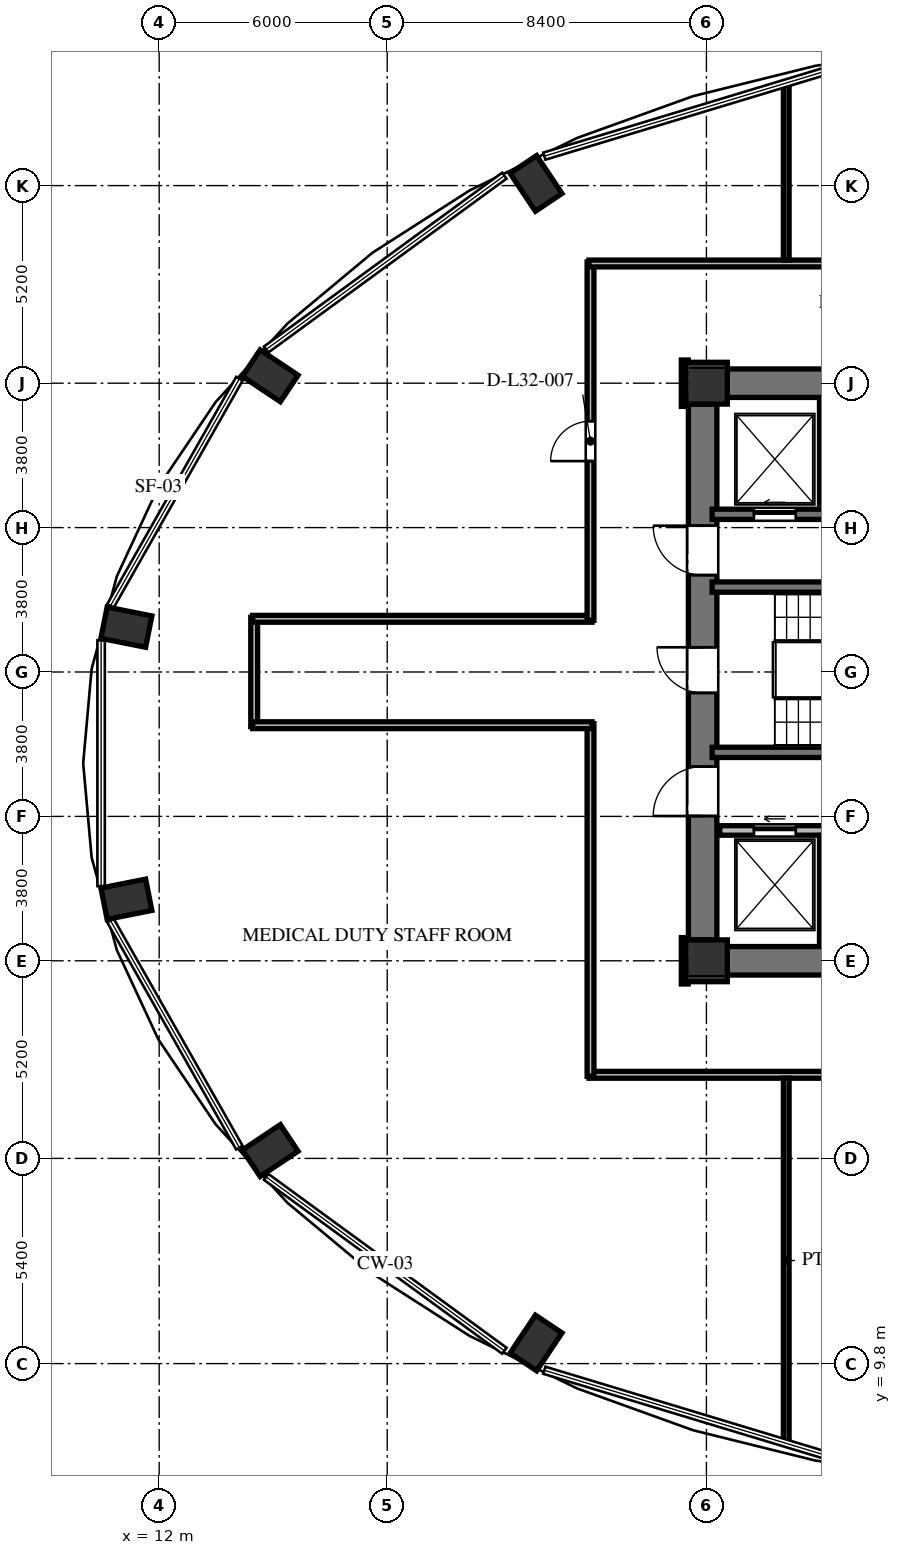
"""IFC4 building model, lengths in metres.
Left out: names, types, materials, properties, quantities, classifications, styles, units other than length and angle.
Written with IfcOpenShell. Run it as: python <this file> out.ifc"""

import sys

from ifc_helpers import new_model, si_unit, direction, frame, frame_2d, origin, origin_2d, place, context, subcontext, project, spatial, rectangle, extrude, element, fill, save


model = new_model("IFC4")
c1 = context("Model", 3, precision=1e-05, world=origin(), true_north=direction((0.0, 1.0)))
c2 = subcontext(c1, "Body", "Model", "MODEL_VIEW")
j1 = project(units=[si_unit("LENGTHUNIT", "METRE"), si_unit("PLANEANGLEUNIT", "RADIAN")], contexts=[c1])
p1 = place(None, origin())
s1 = spatial("IfcSite", under=j1, at=p1, CompositionType="ELEMENT")
p2 = place(p1, origin())
s2 = spatial("IfcBuilding", under=s1, at=p2, CompositionType="ELEMENT")
p3 = place(p2, frame((0.0, 0.0, 125.52)))
s3 = spatial("IfcBuildingStorey", under=s2, at=p3, CompositionType="ELEMENT", Elevation=125.52)
for number, where, z_axis, x_axis in (
    (1, (21.916, 40.857, 0.0), (0.0, 0.0, 1.0), (-0.556, 0.831, 0.0)),
    (2, (14.922, 35.795, 0.0), (0.0, 0.0, 1.0), (-0.831, 0.556, 0.0)),
    (3, (11.137, 29.18, 0.0), (0.0, 0.0, 1.0), (-0.981, 0.195, 0.0)),
    (4, (11.137, 22.02, 0.0), (0.0, 0.0, 1.0), (-0.981, -0.195, 0.0)),
    (5, (14.922, 15.405, 0.0), (0.0, 0.0, 1.0), (-0.831, -0.556, 0.0)),
    (6, (21.916, 10.343, 0.0), (0.0, 0.0, 1.0), (-0.556, -0.831, 0.0)),
):
    element("IfcColumn", number, at=place(p3, frame(where, z_axis=z_axis, x_axis=x_axis)), inside=s3, PredefinedType="COLUMN", context=c2, shape_type="SweptSolid", body=[
        extrude(rectangle(XDim=1.2, YDim=0.84, at=origin_2d()), origin(), (0.0, 0.0, 1.0), 3.648),
    ])
for number, where, z_axis, x_axis in (
    (7, (26.4, 20.4, 0.0), (0.0, 0.0, 1.0), (1.0, 0.0, 0.0)),
    (8, (26.4, 35.6, 0.0), (0.0, 0.0, 1.0), (1.0, 0.0, 0.0)),
):
    element("IfcColumn", number, at=place(p3, frame(where, z_axis=z_axis, x_axis=x_axis)), inside=s3, PredefinedType="COLUMN", context=c2, shape_type="SweptSolid", body=[
        extrude(rectangle(XDim=1.1, YDim=1.1, at=origin_2d()), origin(), (0.0, 0.0, 1.0), 3.648),
    ])
p4 = place(p3, frame((26.3, 20.95, 0.0), z_axis=(0.0, 0.0, 1.0), x_axis=(0.0, 1.0, 0.0)))
e9 = element("IfcWall", 9, at=p4, inside=s3, PredefinedType="SHEAR", context=c2, shape_type="SweptSolid", body=[
    extrude(rectangle(XDim=14.1, YDim=0.75, at=frame_2d((7.05, 0.0))), origin(), (0.0, 0.0, 1.0), 3.648),
])
p5 = place(p4, frame((6.5, 0.0, 0.0)))
e10 = element("IfcOpeningElement", 10, at=p5, cuts=e9, PredefinedType="OPENING", context=c2, shape_type="SweptSolid", body=[
    extrude(rectangle(XDim=1.2, YDim=2.15, at=frame_2d((0.6, 1.075))), frame((0.0, 0.385, 0.0), z_axis=(0.0, -1.0, 0.0), x_axis=(1.0, 0.0, 0.0)), (0.0, 0.0, 1.0), 0.77),
])
p6 = place(p4, frame((9.6, 0.0, 0.0)))
e11 = element("IfcOpeningElement", 11, at=p6, cuts=e9, PredefinedType="OPENING", context=c2, shape_type="SweptSolid", body=[
    extrude(rectangle(XDim=1.3, YDim=2.2, at=frame_2d((0.65, 1.1))), frame((0.0, 0.385, 0.0), z_axis=(0.0, -1.0, 0.0), x_axis=(1.0, 0.0, 0.0)), (0.0, 0.0, 1.0), 0.77),
])
p7 = place(p4, frame((3.26, 0.0, 0.0)))
e12 = element("IfcOpeningElement", 12, at=p7, cuts=e9, PredefinedType="OPENING", context=c2, shape_type="SweptSolid", body=[
    extrude(rectangle(XDim=1.3, YDim=2.2, at=frame_2d((0.65, 1.1))), frame((0.0, 0.385, 0.0), z_axis=(0.0, -1.0, 0.0), x_axis=(1.0, 0.0, 0.0)), (0.0, 0.0, 1.0), 0.77),
])
for number, where, z_axis, x_axis in (
    (13, (26.95, 20.4, 0.0), (0.0, 0.0, 1.0), (1.0, 0.0, 0.0)),
    (14, (26.95, 35.6, 0.0), (0.0, 0.0, 1.0), (1.0, 0.0, 0.0)),
):
    element("IfcWall", number, at=place(p3, frame(where, z_axis=z_axis, x_axis=x_axis)), inside=s3, PredefinedType="SHEAR", context=c2, shape_type="SweptSolid", body=[
        extrude(rectangle(XDim=5.375, YDim=0.75, at=frame_2d((2.688, 0.0))), origin(), (0.0, 0.0, 1.0), 3.648),
    ])
for number, where, z_axis, x_axis in (
    (15, (26.55, 30.235, 0.0), (0.0, 0.0, 1.0), (1.0, 0.0, 0.0)),
    (16, (26.55, 25.885, 0.0), (0.0, 0.0, 1.0), (1.0, 0.0, 0.0)),
):
    element("IfcWall", number, at=place(p3, frame(where, z_axis=z_axis, x_axis=x_axis)), inside=s3, PredefinedType="SHEAR", context=c2, shape_type="SweptSolid", body=[
        extrude(rectangle(XDim=7.985, YDim=0.27, at=frame_2d((3.992, 0.0))), origin(), (0.0, 0.0, 1.0), 3.648),
    ])
p8 = place(p3, frame((26.55, 32.15, 0.0), z_axis=(0.0, 0.0, 1.0), x_axis=(1.0, 0.0, 0.0)))
e17 = element("IfcWall", 17, at=p8, inside=s3, PredefinedType="SHEAR", context=c2, shape_type="SweptSolid", body=[
    extrude(rectangle(XDim=16.4, YDim=0.27, at=frame_2d((8.2, 0.0))), origin(), (0.0, 0.0, 1.0), 3.648),
])
p9 = place(p8, frame((1.1, 0.0, 0.0)))
e18 = element("IfcOpeningElement", 18, at=p9, cuts=e17, PredefinedType="OPENING", context=c2, shape_type="SweptSolid", body=[
    extrude(rectangle(XDim=1.1, YDim=2.2, at=frame_2d((0.55, 1.1))), frame((0.0, 0.145, 0.0), z_axis=(0.0, -1.0, 0.0), x_axis=(1.0, 0.0, 0.0)), (0.0, 0.0, 1.0), 0.29),
])
p10 = place(p8, frame((3.7, 0.0, 0.0)))
e19 = element("IfcOpeningElement", 19, at=p10, cuts=e17, PredefinedType="OPENING", context=c2, shape_type="SweptSolid", body=[
    extrude(rectangle(XDim=1.1, YDim=2.2, at=frame_2d((0.55, 1.1))), frame((0.0, 0.145, 0.0), z_axis=(0.0, -1.0, 0.0), x_axis=(1.0, 0.0, 0.0)), (0.0, 0.0, 1.0), 0.29),
])
p11 = place(p8, frame((6.5, 0.0, 0.0)))
e20 = element("IfcOpeningElement", 20, at=p11, cuts=e17, PredefinedType="OPENING", context=c2, shape_type="SweptSolid", body=[
    extrude(rectangle(XDim=1.1, YDim=2.2, at=frame_2d((0.55, 1.1))), frame((0.0, 0.145, 0.0), z_axis=(0.0, -1.0, 0.0), x_axis=(1.0, 0.0, 0.0)), (0.0, 0.0, 1.0), 0.29),
])
p12 = place(p8, frame((9.1, 0.0, 0.0)))
e21 = element("IfcOpeningElement", 21, at=p12, cuts=e17, PredefinedType="OPENING", context=c2, shape_type="SweptSolid", body=[
    extrude(rectangle(XDim=1.1, YDim=2.2, at=frame_2d((0.55, 1.1))), frame((0.0, 0.145, 0.0), z_axis=(0.0, -1.0, 0.0), x_axis=(1.0, 0.0, 0.0)), (0.0, 0.0, 1.0), 0.29),
])
p13 = place(p8, frame((11.9, 0.0, 0.0)))
e22 = element("IfcOpeningElement", 22, at=p13, cuts=e17, PredefinedType="OPENING", context=c2, shape_type="SweptSolid", body=[
    extrude(rectangle(XDim=1.1, YDim=2.2, at=frame_2d((0.55, 1.1))), frame((0.0, 0.145, 0.0), z_axis=(0.0, -1.0, 0.0), x_axis=(1.0, 0.0, 0.0)), (0.0, 0.0, 1.0), 0.29),
])
p14 = place(p8, frame((14.5, 0.0, 0.0)))
e23 = element("IfcOpeningElement", 23, at=p14, cuts=e17, PredefinedType="OPENING", context=c2, shape_type="SweptSolid", body=[
    extrude(rectangle(XDim=1.1, YDim=2.2, at=frame_2d((0.55, 1.1))), frame((0.0, 0.145, 0.0), z_axis=(0.0, -1.0, 0.0), x_axis=(1.0, 0.0, 0.0)), (0.0, 0.0, 1.0), 0.29),
])
p15 = place(p3, frame((26.75, 23.83, 0.0), z_axis=(0.0, 0.0, 1.0), x_axis=(1.0, 0.0, 0.0)))
e24 = element("IfcWall", 24, at=p15, inside=s3, PredefinedType="SOLIDWALL", context=c2, shape_type="SweptSolid", body=[
    extrude(rectangle(XDim=16.2, YDim=0.25, at=frame_2d((8.1, 0.0))), origin(), (0.0, 0.0, 1.0), 3.428),
])
p16 = place(p15, frame((0.9, 0.0, 0.0)))
e25 = element("IfcOpeningElement", 25, at=p16, cuts=e24, PredefinedType="OPENING", context=c2, shape_type="SweptSolid", body=[
    extrude(rectangle(XDim=1.1, YDim=2.2, at=frame_2d((0.55, 1.1))), frame((0.0, 0.135, 0.0), z_axis=(0.0, -1.0, 0.0), x_axis=(1.0, 0.0, 0.0)), (0.0, 0.0, 1.0), 0.27),
])
p17 = place(p15, frame((3.5, 0.0, 0.0)))
e26 = element("IfcOpeningElement", 26, at=p17, cuts=e24, PredefinedType="OPENING", context=c2, shape_type="SweptSolid", body=[
    extrude(rectangle(XDim=1.1, YDim=2.2, at=frame_2d((0.55, 1.1))), frame((0.0, 0.135, 0.0), z_axis=(0.0, -1.0, 0.0), x_axis=(1.0, 0.0, 0.0)), (0.0, 0.0, 1.0), 0.27),
])
p18 = place(p15, frame((6.3, 0.0, 0.0)))
e27 = element("IfcOpeningElement", 27, at=p18, cuts=e24, PredefinedType="OPENING", context=c2, shape_type="SweptSolid", body=[
    extrude(rectangle(XDim=1.1, YDim=2.2, at=frame_2d((0.55, 1.1))), frame((0.0, 0.135, 0.0), z_axis=(0.0, -1.0, 0.0), x_axis=(1.0, 0.0, 0.0)), (0.0, 0.0, 1.0), 0.27),
])
p19 = place(p15, frame((8.9, 0.0, 0.0)))
e28 = element("IfcOpeningElement", 28, at=p19, cuts=e24, PredefinedType="OPENING", context=c2, shape_type="SweptSolid", body=[
    extrude(rectangle(XDim=1.1, YDim=2.2, at=frame_2d((0.55, 1.1))), frame((0.0, 0.135, 0.0), z_axis=(0.0, -1.0, 0.0), x_axis=(1.0, 0.0, 0.0)), (0.0, 0.0, 1.0), 0.27),
])
p20 = place(p15, frame((11.7, 0.0, 0.0)))
e29 = element("IfcOpeningElement", 29, at=p20, cuts=e24, PredefinedType="OPENING", context=c2, shape_type="SweptSolid", body=[
    extrude(rectangle(XDim=1.1, YDim=2.2, at=frame_2d((0.55, 1.1))), frame((0.0, 0.135, 0.0), z_axis=(0.0, -1.0, 0.0), x_axis=(1.0, 0.0, 0.0)), (0.0, 0.0, 1.0), 0.27),
])
p21 = place(p15, frame((14.15, 0.0, 0.0)))
e30 = element("IfcOpeningElement", 30, at=p21, cuts=e24, PredefinedType="OPENING", context=c2, shape_type="SweptSolid", body=[
    extrude(rectangle(XDim=1.4, YDim=2.3, at=frame_2d((0.7, 1.15))), frame((0.0, 0.135, 0.0), z_axis=(0.0, -1.0, 0.0), x_axis=(1.0, 0.0, 0.0)), (0.0, 0.0, 1.0), 0.27),
])
p22 = place(p3, frame((29.5, 32.42, 0.0), z_axis=(0.0, 0.0, 1.0), x_axis=(0.0, 1.0, 0.0)))
e31 = element("IfcWall", 31, at=p22, inside=s3, PredefinedType="SOLIDWALL", context=c2, shape_type="SweptSolid", body=[
    extrude(rectangle(XDim=2.68, YDim=0.25, at=frame_2d((1.34, 0.0))), origin(), (0.0, 0.0, 1.0), 3.428),
])
p23 = place(p3, frame((29.5, 20.9, 0.0), z_axis=(0.0, 0.0, 1.0), x_axis=(0.0, 1.0, 0.0)))
e32 = element("IfcWall", 32, at=p23, inside=s3, PredefinedType="SOLIDWALL", context=c2, shape_type="SweptSolid", body=[
    extrude(rectangle(XDim=2.8, YDim=0.25, at=frame_2d((1.4, 0.0))), origin(), (0.0, 0.0, 1.0), 3.428),
])
p24 = place(p3, frame((14.5, 26.56, 0.0), z_axis=(0.0, 0.0, 1.0), x_axis=(0.0, 1.0, 0.0)))
e33 = element("IfcWall", 33, at=p24, inside=s3, PredefinedType="PARTITIONING", context=c2, shape_type="SweptSolid", body=[
    extrude(rectangle(XDim=2.88, YDim=0.18, at=frame_2d((1.44, 0.0))), origin(), (0.0, 0.0, 1.0), 3.013),
])
p25 = place(p3, frame((14.46, 29.4, 0.0), z_axis=(0.0, 0.0, 1.0), x_axis=(1.0, 0.0, 0.0)))
e34 = element("IfcWall", 34, at=p25, inside=s3, PredefinedType="PARTITIONING", context=c2, shape_type="SweptSolid", body=[
    extrude(rectangle(XDim=8.93, YDim=0.18, at=frame_2d((4.465, 0.0))), origin(), (0.0, 0.0, 1.0), 3.428),
])
p26 = place(p3, frame((23.35, 29.36, 0.0), z_axis=(0.0, 0.0, 1.0), x_axis=(0.0, 1.0, 0.0)))
e35 = element("IfcWall", 35, at=p26, inside=s3, PredefinedType="PARTITIONING", context=c2, shape_type="SweptSolid", body=[
    extrude(rectangle(XDim=9.43, YDim=0.18, at=frame_2d((4.715, 0.0))), origin(), (0.0, 0.0, 1.0), 3.428),
])
p27 = place(p26, frame((4.19, 0.0, 0.0)))
e36 = element("IfcOpeningElement", 36, at=p27, cuts=e35, PredefinedType="OPENING", context=c2, shape_type="SweptSolid", body=[
    extrude(rectangle(XDim=1.05, YDim=2.15, at=frame_2d((0.525, 1.075))), frame((0.0, 0.1, 0.0), z_axis=(0.0, -1.0, 0.0), x_axis=(1.0, 0.0, 0.0)), (0.0, 0.0, 1.0), 0.2),
])
p28 = place(p3, frame((23.31, 38.75, 0.0), z_axis=(0.0, 0.0, 1.0), x_axis=(1.0, 0.0, 0.0)))
e37 = element("IfcWall", 37, at=p28, inside=s3, PredefinedType="PARTITIONING", context=c2, shape_type="SweptSolid", body=[
    extrude(rectangle(XDim=29.88, YDim=0.18, at=frame_2d((14.94, 0.0))), origin(), (0.0, 0.0, 1.0), 3.053),
])
p29 = place(p28, frame((26.101, 0.0, 0.0)))
e38 = element("IfcOpeningElement", 38, at=p29, cuts=e37, PredefinedType="OPENING", context=c2, shape_type="SweptSolid", body=[
    extrude(rectangle(XDim=1.05, YDim=2.15, at=frame_2d((0.525, 1.075))), frame((0.0, 0.1, 0.0), z_axis=(0.0, -1.0, 0.0), x_axis=(1.0, 0.0, 0.0)), (0.0, 0.0, 1.0), 0.2),
])
p30 = place(p28, frame((15.74, 0.0, 0.0)))
e39 = element("IfcOpeningElement", 39, at=p30, cuts=e37, PredefinedType="OPENING", context=c2, shape_type="SweptSolid", body=[
    extrude(rectangle(XDim=1.4, YDim=2.2, at=frame_2d((0.7, 1.1))), frame((0.0, 0.1, 0.0), z_axis=(0.0, -1.0, 0.0), x_axis=(1.0, 0.0, 0.0)), (0.0, 0.0, 1.0), 0.2),
])
p31 = place(p28, frame((6.665, 0.0, 0.0)))
e40 = element("IfcOpeningElement", 40, at=p31, cuts=e37, PredefinedType="OPENING", context=c2, shape_type="SweptSolid", body=[
    extrude(rectangle(XDim=1.05, YDim=2.15, at=frame_2d((0.525, 1.075))), frame((0.0, 0.1, 0.0), z_axis=(0.0, -1.0, 0.0), x_axis=(1.0, 0.0, 0.0)), (0.0, 0.0, 1.0), 0.2),
])
for number, where, z_axis, x_axis in (
    (41, (25.83, 36.21, 0.0), (0.0, 0.0, 1.0), (0.0, -1.0, 0.0)),
    (42, (25.83, 21.01, 0.0), (0.0, 0.0, 1.0), (0.0, -1.0, 0.0)),
):
    element("IfcWall", number, at=place(p3, frame(where, z_axis=z_axis, x_axis=x_axis)), inside=s3, PredefinedType="PARTITIONING", context=c2, shape_type="SweptSolid", body=[
        extrude(rectangle(XDim=1.22, YDim=0.18, at=frame_2d((0.61, 0.0))), origin(), (0.0, 0.0, 1.0), 3.428),
    ])
p32 = place(p3, frame((45.24, 17.4, 0.0), z_axis=(0.0, 0.0, 1.0), x_axis=(-1.0, 0.0, 0.0)))
e43 = element("IfcWall", 43, at=p32, inside=s3, PredefinedType="PARTITIONING", context=c2, shape_type="SweptSolid", body=[
    extrude(rectangle(XDim=21.93, YDim=0.18, at=frame_2d((10.965, 0.0))), origin(), (0.0, 0.0, 1.0), 3.053),
])
p33 = place(p32, frame((8.004, 0.0, 0.0)))
e44 = element("IfcOpeningElement", 44, at=p33, cuts=e43, PredefinedType="OPENING", context=c2, shape_type="SweptSolid", body=[
    extrude(rectangle(XDim=1.05, YDim=2.15, at=frame_2d((0.525, 1.075))), frame((0.0, 0.1, 0.0), z_axis=(0.0, -1.0, 0.0), x_axis=(1.0, 0.0, 0.0)), (0.0, 0.0, 1.0), 0.2),
])
p34 = place(p3, frame((23.35, 17.36, 0.0), z_axis=(0.0, 0.0, 1.0), x_axis=(0.0, 1.0, 0.0)))
e45 = element("IfcWall", 45, at=p34, inside=s3, PredefinedType="PARTITIONING", context=c2, shape_type="SweptSolid", body=[
    extrude(rectangle(XDim=9.28, YDim=0.18, at=frame_2d((4.64, 0.0))), origin(), (0.0, 0.0, 1.0), 3.428),
])
p35 = place(p3, frame((23.39, 26.6, 0.0), z_axis=(0.0, 0.0, 1.0), x_axis=(-1.0, 0.0, 0.0)))
e46 = element("IfcWall", 46, at=p35, inside=s3, PredefinedType="PARTITIONING", context=c2, shape_type="SweptSolid", body=[
    extrude(rectangle(XDim=8.93, YDim=0.18, at=frame_2d((4.465, 0.0))), origin(), (0.0, 0.0, 1.0), 3.428),
])
p36 = place(p3, frame((28.5, 38.84, 0.0), z_axis=(0.0, 0.0, 1.0), x_axis=(0.0, 1.0, 0.0)))
e47 = element("IfcWall", 47, at=p36, inside=s3, PredefinedType="PARTITIONING", context=c2, shape_type="SweptSolid", body=[
    extrude(rectangle(XDim=4.645, YDim=0.15, at=frame_2d((2.323, 0.0))), origin(), (0.0, 0.0, 1.0), 3.428),
])
p37 = place(p3, frame((28.5, 7.715, 0.0), z_axis=(0.0, 0.0, 1.0), x_axis=(0.0, 1.0, 0.0)))
e48 = element("IfcWall", 48, at=p37, inside=s3, PredefinedType="PARTITIONING", context=c2, shape_type="SweptSolid", body=[
    extrude(rectangle(XDim=9.595, YDim=0.15, at=frame_2d((4.797, 0.0))), origin(), (0.0, 0.0, 1.0), 3.428),
])
p38 = place(p5, origin())
e49 = element("IfcDoor", 49, at=p38, inside=s3, OperationType="SINGLE_SWING_RIGHT", PredefinedType="DOOR", context=c2, shape_type="SweptSolid", body=[
    extrude(rectangle(XDim=1.2, YDim=2.15, at=frame_2d((0.6, 1.075))), frame((0.0, 0.025, 0.0), z_axis=(0.0, -1.0, 0.0), x_axis=(1.0, 0.0, 0.0)), (0.0, 0.0, 1.0), 0.05),
])
fill(e10, e49)
p39 = place(p6, origin())
e50 = element("IfcDoor", 50, at=p39, inside=s3, OperationType="SINGLE_SWING_RIGHT", PredefinedType="DOOR", context=c2, shape_type="SweptSolid", body=[
    extrude(rectangle(XDim=1.3, YDim=2.2, at=frame_2d((0.65, 1.1))), frame((0.0, 0.025, 0.0), z_axis=(0.0, -1.0, 0.0), x_axis=(1.0, 0.0, 0.0)), (0.0, 0.0, 1.0), 0.05),
])
fill(e11, e50)
p40 = place(p7, origin())
e51 = element("IfcDoor", 51, at=p40, inside=s3, OperationType="SINGLE_SWING_LEFT", PredefinedType="DOOR", context=c2, shape_type="SweptSolid", body=[
    extrude(rectangle(XDim=1.3, YDim=2.2, at=frame_2d((0.65, 1.1))), frame((0.0, 0.025, 0.0), z_axis=(0.0, -1.0, 0.0), x_axis=(1.0, 0.0, 0.0)), (0.0, 0.0, 1.0), 0.05),
])
fill(e12, e51)
p41 = place(p9, origin())
e52 = element("IfcDoor", 52, at=p41, inside=s3, OperationType="SLIDING_TO_LEFT", PredefinedType="DOOR", context=c2, shape_type="SweptSolid", body=[
    extrude(rectangle(XDim=1.1, YDim=2.2, at=frame_2d((0.55, 1.1))), frame((0.0, 0.025, 0.0), z_axis=(0.0, -1.0, 0.0), x_axis=(1.0, 0.0, 0.0)), (0.0, 0.0, 1.0), 0.05),
])
fill(e18, e52)
p42 = place(p16, origin())
e53 = element("IfcDoor", 53, at=p42, inside=s3, OperationType="SLIDING_TO_LEFT", PredefinedType="DOOR", context=c2, shape_type="SweptSolid", body=[
    extrude(rectangle(XDim=1.1, YDim=2.2, at=frame_2d((0.55, 1.1))), frame((0.0, 0.025, 0.0), z_axis=(0.0, -1.0, 0.0), x_axis=(1.0, 0.0, 0.0)), (0.0, 0.0, 1.0), 0.05),
])
fill(e25, e53)
p43 = place(p27, origin())
e54 = element("IfcDoor", 54, at=p43, inside=s3, OperationType="SINGLE_SWING_LEFT", PredefinedType="DOOR", context=c2, shape_type="SweptSolid", body=[
    extrude(rectangle(XDim=1.05, YDim=2.15, at=frame_2d((0.525, 1.075))), frame((0.0, 0.025, 0.0), z_axis=(0.0, -1.0, 0.0), x_axis=(1.0, 0.0, 0.0)), (0.0, 0.0, 1.0), 0.05),
])
fill(e36, e54)
save(model, sys.argv[1])
